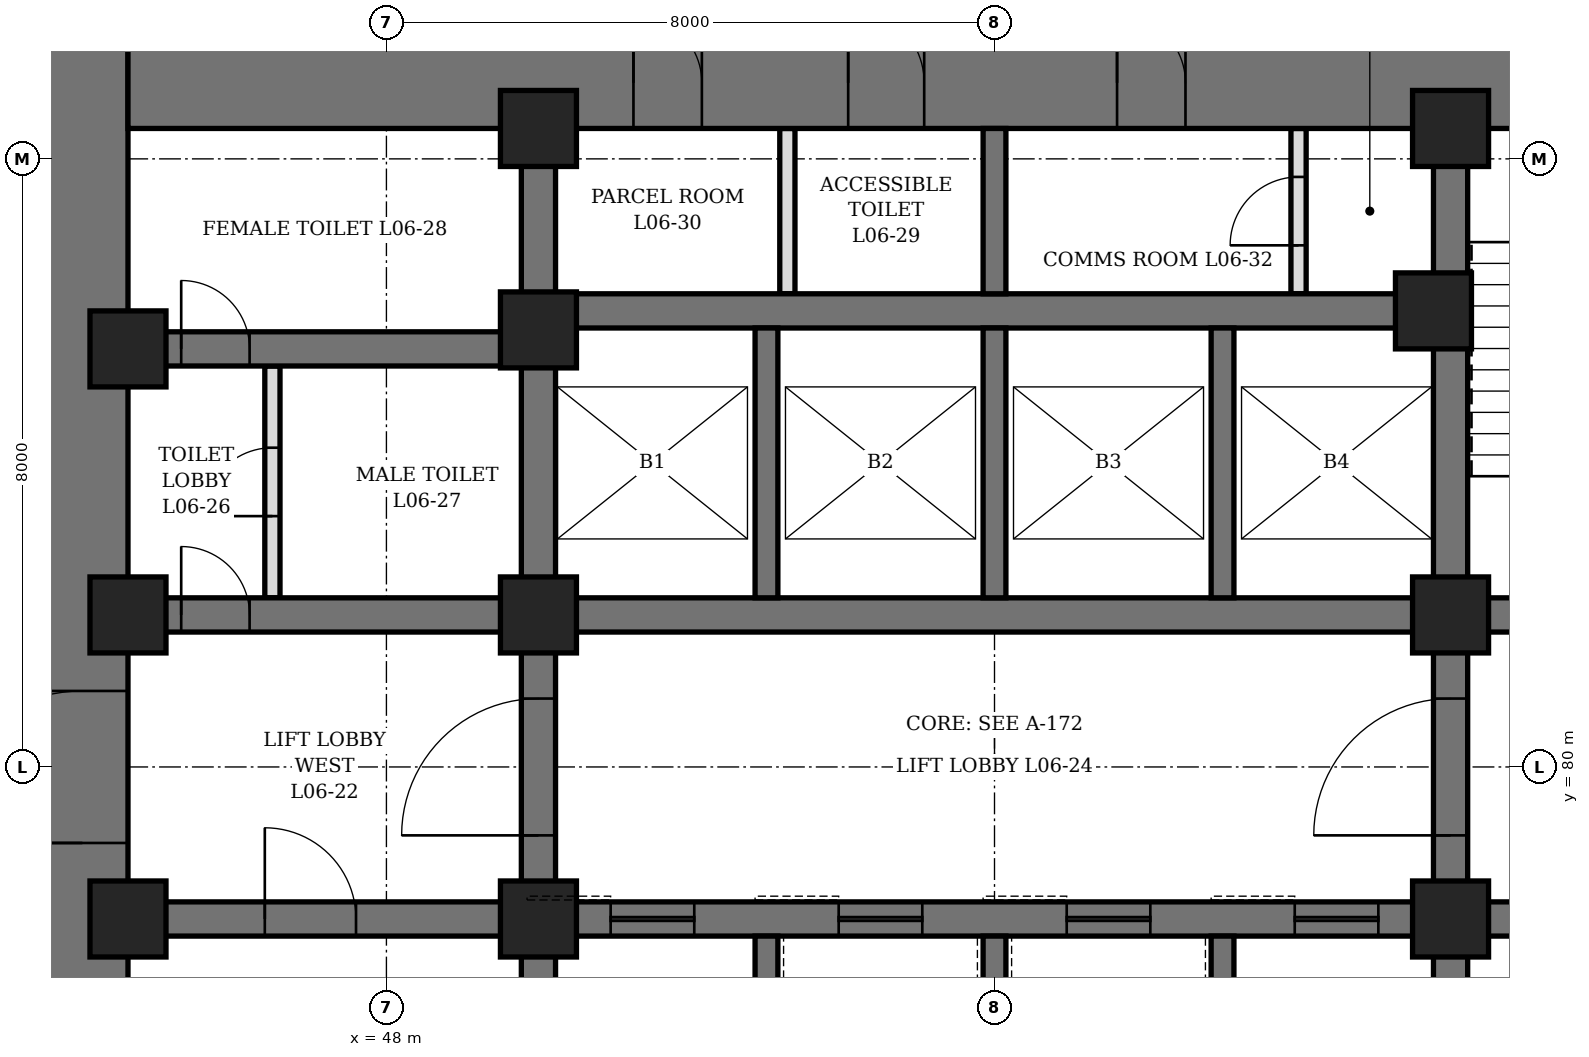
"""IFC4 building model, lengths in metres.
Left out: names, types, materials, properties, quantities, classifications, styles, units other than length and angle.
Written with IfcOpenShell. Run it as: python <this file> out.ifc"""

import sys

from ifc_helpers import new_model, si_unit, direction, frame, frame_2d, origin, origin_2d, place, context, subcontext, project, spatial, rectangle, hollow_rectangle, extrude, element, fill, save


model = new_model("IFC4")
c1 = context("Model", 3, precision=1e-05, world=origin(), true_north=direction((0.0, 1.0)))
c2 = subcontext(c1, "Body", "Model", "MODEL_VIEW")
j1 = project(units=[si_unit("LENGTHUNIT", "METRE"), si_unit("PLANEANGLEUNIT", "RADIAN")], contexts=[c1])
p1 = place(None, origin())
s1 = spatial("IfcSite", under=j1, at=p1, CompositionType="ELEMENT")
p2 = place(p1, origin())
s2 = spatial("IfcBuilding", under=s1, at=p2, CompositionType="ELEMENT")
p3 = place(p2, frame((0.0, 0.0, 34.9)))
s3 = spatial("IfcBuildingStorey", under=s2, at=p3, CompositionType="ELEMENT", Elevation=34.9)
p4 = place(p3, frame((44.0, 70.4, 0.0), z_axis=(0.0, 0.0, 1.0), x_axis=(0.0, 1.0, 0.0)))
e1 = element("IfcWall", 1, at=p4, inside=s3, PredefinedType="SHEAR", context=c2, shape_type="SweptSolid", body=[
    extrude(rectangle(XDim=19.2, YDim=1.2, at=frame_2d((9.6, 0.0))), origin(), (0.0, 0.0, 1.0), 4.2),
])
p5 = place(p4, frame((8.6, 0.0, 0.0)))
e2 = element("IfcOpeningElement", 2, at=p5, cuts=e1, PredefinedType="OPENING", context=c2, shape_type="SweptSolid", body=[
    extrude(rectangle(XDim=2.0, YDim=2.4, at=frame_2d((1.0, 1.2))), frame((0.0, 0.61, 0.0), z_axis=(0.0, -1.0, 0.0), x_axis=(1.0, 0.0, 0.0)), (0.0, 0.0, 1.0), 1.22),
])
p6 = place(p3, frame((44.6, 89.0, 0.0), z_axis=(0.0, 0.0, 1.0), x_axis=(1.0, 0.0, 0.0)))
e3 = element("IfcWall", 3, at=p6, inside=s3, PredefinedType="SHEAR", context=c2, shape_type="SweptSolid", body=[
    extrude(rectangle(XDim=22.8, YDim=1.2, at=frame_2d((11.4, 0.0))), origin(), (0.0, 0.0, 1.0), 4.2),
])
p7 = place(p6, frame((9.475, 0.0, 0.0)))
e4 = element("IfcOpeningElement", 4, at=p7, cuts=e3, PredefinedType="OPENING", context=c2, shape_type="SweptSolid", body=[
    extrude(rectangle(XDim=1.0, YDim=2.1, at=frame_2d((0.5, 1.05))), frame((0.0, 0.61, 0.0), z_axis=(0.0, -1.0, 0.0), x_axis=(1.0, 0.0, 0.0)), (0.0, 0.0, 1.0), 1.22),
])
p8 = place(p6, frame((6.65, 0.0, 0.0)))
e5 = element("IfcOpeningElement", 5, at=p8, cuts=e3, PredefinedType="OPENING", context=c2, shape_type="SweptSolid", body=[
    extrude(rectangle(XDim=0.9, YDim=2.1, at=frame_2d((0.45, 1.05))), frame((0.0, 0.61, 0.0), z_axis=(0.0, -1.0, 0.0), x_axis=(1.0, 0.0, 0.0)), (0.0, 0.0, 1.0), 1.22),
])
p9 = place(p6, frame((13.012, 0.0, 0.0)))
e6 = element("IfcOpeningElement", 6, at=p9, cuts=e3, PredefinedType="OPENING", context=c2, shape_type="SweptSolid", body=[
    extrude(rectangle(XDim=0.9, YDim=2.1, at=frame_2d((0.45, 1.05))), frame((0.0, 0.61, 0.0), z_axis=(0.0, -1.0, 0.0), x_axis=(1.0, 0.0, 0.0)), (0.0, 0.0, 1.0), 1.22),
])
p10 = place(p3, frame((50.0, 71.6, 0.0), z_axis=(0.0, 0.0, 1.0), x_axis=(0.0, 1.0, 0.0)))
e7 = element("IfcWall", 7, at=p10, inside=s3, PredefinedType="SHEAR", context=c2, shape_type="SweptSolid", body=[
    extrude(rectangle(XDim=16.8, YDim=0.45, at=frame_2d((8.4, 0.0))), origin(), (0.0, 0.0, 1.0), 4.2),
])
p11 = place(p10, frame((7.5, 0.0, 0.0)))
e8 = element("IfcOpeningElement", 8, at=p11, cuts=e7, PredefinedType="OPENING", context=c2, shape_type="SweptSolid", body=[
    extrude(rectangle(XDim=1.8, YDim=2.4, at=frame_2d((0.9, 1.2))), frame((0.0, 0.235, 0.0), z_axis=(0.0, -1.0, 0.0), x_axis=(1.0, 0.0, 0.0)), (0.0, 0.0, 1.0), 0.47),
])
p12 = place(p3, frame((62.0, 71.6, 0.0), z_axis=(0.0, 0.0, 1.0), x_axis=(0.0, 1.0, 0.0)))
e9 = element("IfcWall", 9, at=p12, inside=s3, PredefinedType="SHEAR", context=c2, shape_type="SweptSolid", body=[
    extrude(rectangle(XDim=16.8, YDim=0.45, at=frame_2d((8.4, 0.0))), origin(), (0.0, 0.0, 1.0), 4.2),
])
p13 = place(p12, frame((7.5, 0.0, 0.0)))
e10 = element("IfcOpeningElement", 10, at=p13, cuts=e9, PredefinedType="OPENING", context=c2, shape_type="SweptSolid", body=[
    extrude(rectangle(XDim=1.8, YDim=2.4, at=frame_2d((0.9, 1.2))), frame((0.0, 0.235, 0.0), z_axis=(0.0, -1.0, 0.0), x_axis=(1.0, 0.0, 0.0)), (0.0, 0.0, 1.0), 0.47),
])
p14 = place(p3, frame((44.6, 78.0, 0.0), z_axis=(0.0, 0.0, 1.0), x_axis=(1.0, 0.0, 0.0)))
e11 = element("IfcWall", 11, at=p14, inside=s3, PredefinedType="SHEAR", context=c2, shape_type="SweptSolid", body=[
    extrude(rectangle(XDim=5.175, YDim=0.45, at=frame_2d((2.587, 0.0))), origin(), (0.0, 0.0, 1.0), 4.2),
])
p15 = place(p14, frame((1.8, 0.0, 0.0)))
e12 = element("IfcOpeningElement", 12, at=p15, cuts=e11, PredefinedType="OPENING", context=c2, shape_type="SweptSolid", body=[
    extrude(rectangle(XDim=1.2, YDim=2.1, at=frame_2d((0.6, 1.05))), frame((0.0, 0.235, 0.0), z_axis=(0.0, -1.0, 0.0), x_axis=(1.0, 0.0, 0.0)), (0.0, 0.0, 1.0), 0.47),
])
p16 = place(p3, frame((44.6, 82.0, 0.0), z_axis=(0.0, 0.0, 1.0), x_axis=(1.0, 0.0, 0.0)))
e13 = element("IfcWall", 13, at=p16, inside=s3, PredefinedType="SHEAR", context=c2, shape_type="SweptSolid", body=[
    extrude(rectangle(XDim=5.175, YDim=0.45, at=frame_2d((2.587, 0.0))), origin(), (0.0, 0.0, 1.0), 4.2),
])
p17 = place(p16, frame((0.7, 0.0, 0.0)))
e14 = element("IfcOpeningElement", 14, at=p17, cuts=e13, PredefinedType="OPENING", context=c2, shape_type="SweptSolid", body=[
    extrude(rectangle(XDim=0.9, YDim=2.1, at=frame_2d((0.45, 1.05))), frame((0.0, 0.235, 0.0), z_axis=(0.0, -1.0, 0.0), x_axis=(1.0, 0.0, 0.0)), (0.0, 0.0, 1.0), 0.47),
])
p18 = place(p3, frame((44.6, 85.5, 0.0), z_axis=(0.0, 0.0, 1.0), x_axis=(1.0, 0.0, 0.0)))
e15 = element("IfcWall", 15, at=p18, inside=s3, PredefinedType="SHEAR", context=c2, shape_type="SweptSolid", body=[
    extrude(rectangle(XDim=5.175, YDim=0.45, at=frame_2d((2.587, 0.0))), origin(), (0.0, 0.0, 1.0), 4.2),
])
p19 = place(p18, frame((0.7, 0.0, 0.0)))
e16 = element("IfcOpeningElement", 16, at=p19, cuts=e15, PredefinedType="OPENING", context=c2, shape_type="SweptSolid", body=[
    extrude(rectangle(XDim=0.9, YDim=2.1, at=frame_2d((0.45, 1.05))), frame((0.0, 0.235, 0.0), z_axis=(0.0, -1.0, 0.0), x_axis=(1.0, 0.0, 0.0)), (0.0, 0.0, 1.0), 0.47),
])
p20 = place(p3, frame((62.225, 78.0, 0.0), z_axis=(0.0, 0.0, 1.0), x_axis=(1.0, 0.0, 0.0)))
e17 = element("IfcWall", 17, at=p20, inside=s3, PredefinedType="SHEAR", context=c2, shape_type="SweptSolid", body=[
    extrude(rectangle(XDim=5.175, YDim=0.45, at=frame_2d((2.587, 0.0))), origin(), (0.0, 0.0, 1.0), 4.2),
])
p21 = place(p20, frame((2.175, 0.0, 0.0)))
e18 = element("IfcOpeningElement", 18, at=p21, cuts=e17, PredefinedType="OPENING", context=c2, shape_type="SweptSolid", body=[
    extrude(rectangle(XDim=1.2, YDim=2.1, at=frame_2d((0.6, 1.05))), frame((0.0, 0.235, 0.0), z_axis=(0.0, -1.0, 0.0), x_axis=(1.0, 0.0, 0.0)), (0.0, 0.0, 1.0), 0.47),
])
p22 = place(p3, frame((62.225, 82.0, 0.0), z_axis=(0.0, 0.0, 1.0), x_axis=(1.0, 0.0, 0.0)))
e19 = element("IfcWall", 19, at=p22, inside=s3, PredefinedType="SHEAR", context=c2, shape_type="SweptSolid", body=[
    extrude(rectangle(XDim=5.175, YDim=0.45, at=frame_2d((2.587, 0.0))), origin(), (0.0, 0.0, 1.0), 4.2),
])
p23 = place(p22, frame((2.175, 0.0, 0.0)))
e20 = element("IfcOpeningElement", 20, at=p23, cuts=e19, PredefinedType="OPENING", context=c2, shape_type="SweptSolid", body=[
    extrude(rectangle(XDim=1.2, YDim=2.1, at=frame_2d((0.6, 1.05))), frame((0.0, 0.235, 0.0), z_axis=(0.0, -1.0, 0.0), x_axis=(1.0, 0.0, 0.0)), (0.0, 0.0, 1.0), 0.47),
])
p24 = place(p3, frame((50.225, 78.0, 0.0), z_axis=(0.0, 0.0, 1.0), x_axis=(1.0, 0.0, 0.0)))
e21 = element("IfcWall", 21, at=p24, inside=s3, PredefinedType="SHEAR", context=c2, shape_type="SweptSolid", body=[
    extrude(rectangle(XDim=11.55, YDim=0.45, at=frame_2d((5.775, 0.0))), origin(), (0.0, 0.0, 1.0), 4.2),
])
p25 = place(p24, frame((0.725, 0.0, 0.0)))
e22 = element("IfcOpeningElement", 22, at=p25, cuts=e21, PredefinedType="OPENING", context=c2, shape_type="SweptSolid", body=[
    extrude(rectangle(XDim=1.1, YDim=2.2, at=frame_2d((0.55, 1.1))), frame((0.0, 0.235, 0.0), z_axis=(0.0, -1.0, 0.0), x_axis=(1.0, 0.0, 0.0)), (0.0, 0.0, 1.0), 0.47),
])
p26 = place(p24, frame((3.725, 0.0, 0.0)))
e23 = element("IfcOpeningElement", 23, at=p26, cuts=e21, PredefinedType="OPENING", context=c2, shape_type="SweptSolid", body=[
    extrude(rectangle(XDim=1.1, YDim=2.2, at=frame_2d((0.55, 1.1))), frame((0.0, 0.235, 0.0), z_axis=(0.0, -1.0, 0.0), x_axis=(1.0, 0.0, 0.0)), (0.0, 0.0, 1.0), 0.47),
])
p27 = place(p24, frame((6.725, 0.0, 0.0)))
e24 = element("IfcOpeningElement", 24, at=p27, cuts=e21, PredefinedType="OPENING", context=c2, shape_type="SweptSolid", body=[
    extrude(rectangle(XDim=1.1, YDim=2.2, at=frame_2d((0.55, 1.1))), frame((0.0, 0.235, 0.0), z_axis=(0.0, -1.0, 0.0), x_axis=(1.0, 0.0, 0.0)), (0.0, 0.0, 1.0), 0.47),
])
p28 = place(p24, frame((9.725, 0.0, 0.0)))
e25 = element("IfcOpeningElement", 25, at=p28, cuts=e21, PredefinedType="OPENING", context=c2, shape_type="SweptSolid", body=[
    extrude(rectangle(XDim=1.1, YDim=2.2, at=frame_2d((0.55, 1.1))), frame((0.0, 0.235, 0.0), z_axis=(0.0, -1.0, 0.0), x_axis=(1.0, 0.0, 0.0)), (0.0, 0.0, 1.0), 0.47),
])
for number, where, z_axis, x_axis in (
    (26, (50.225, 82.0, 0.0), (0.0, 0.0, 1.0), (1.0, 0.0, 0.0)),
    (27, (50.225, 86.0, 0.0), (0.0, 0.0, 1.0), (1.0, 0.0, 0.0)),
):
    element("IfcWall", number, at=place(p3, frame(where, z_axis=z_axis, x_axis=x_axis)), inside=s3, PredefinedType="SHEAR", context=c2, shape_type="SweptSolid", body=[
        extrude(rectangle(XDim=11.55, YDim=0.45, at=frame_2d((5.775, 0.0))), origin(), (0.0, 0.0, 1.0), 4.2),
    ])
p29 = place(p3, frame((53.0, 74.15, 0.0), z_axis=(0.0, 0.0, 1.0), x_axis=(0.0, 1.0, 0.0)))
e28 = element("IfcWall", 28, at=p29, inside=s3, PredefinedType="SHEAR", context=c2, shape_type="SweptSolid", body=[
    extrude(rectangle(XDim=3.625, YDim=0.3, at=frame_2d((1.812, 0.0))), origin(), (0.0, 0.0, 1.0), 4.2),
])
p30 = place(p3, frame((53.0, 82.225, 0.0), z_axis=(0.0, 0.0, 1.0), x_axis=(0.0, 1.0, 0.0)))
e29 = element("IfcWall", 29, at=p30, inside=s3, PredefinedType="SHEAR", context=c2, shape_type="SweptSolid", body=[
    extrude(rectangle(XDim=3.55, YDim=0.3, at=frame_2d((1.775, 0.0))), origin(), (0.0, 0.0, 1.0), 4.2),
])
p31 = place(p3, frame((56.0, 74.15, 0.0), z_axis=(0.0, 0.0, 1.0), x_axis=(0.0, 1.0, 0.0)))
e30 = element("IfcWall", 30, at=p31, inside=s3, PredefinedType="SHEAR", context=c2, shape_type="SweptSolid", body=[
    extrude(rectangle(XDim=3.625, YDim=0.3, at=frame_2d((1.812, 0.0))), origin(), (0.0, 0.0, 1.0), 4.2),
])
p32 = place(p3, frame((56.0, 82.225, 0.0), z_axis=(0.0, 0.0, 1.0), x_axis=(0.0, 1.0, 0.0)))
e31 = element("IfcWall", 31, at=p32, inside=s3, PredefinedType="SHEAR", context=c2, shape_type="SweptSolid", body=[
    extrude(rectangle(XDim=3.55, YDim=0.3, at=frame_2d((1.775, 0.0))), origin(), (0.0, 0.0, 1.0), 4.2),
])
p33 = place(p3, frame((59.0, 74.15, 0.0), z_axis=(0.0, 0.0, 1.0), x_axis=(0.0, 1.0, 0.0)))
e32 = element("IfcWall", 32, at=p33, inside=s3, PredefinedType="SHEAR", context=c2, shape_type="SweptSolid", body=[
    extrude(rectangle(XDim=3.625, YDim=0.3, at=frame_2d((1.812, 0.0))), origin(), (0.0, 0.0, 1.0), 4.2),
])
p34 = place(p3, frame((59.0, 82.225, 0.0), z_axis=(0.0, 0.0, 1.0), x_axis=(0.0, 1.0, 0.0)))
e33 = element("IfcWall", 33, at=p34, inside=s3, PredefinedType="SHEAR", context=c2, shape_type="SweptSolid", body=[
    extrude(rectangle(XDim=3.55, YDim=0.3, at=frame_2d((1.775, 0.0))), origin(), (0.0, 0.0, 1.0), 4.2),
])
p35 = place(p3, frame((56.0, 86.225, 0.0), z_axis=(0.0, 0.0, 1.0), x_axis=(0.0, 1.0, 0.0)))
e34 = element("IfcWall", 34, at=p35, inside=s3, PredefinedType="SHEAR", context=c2, shape_type="SweptSolid", body=[
    extrude(rectangle(XDim=2.175, YDim=0.3, at=frame_2d((1.087, 0.0))), origin(), (0.0, 0.0, 1.0), 4.2),
])
for number, where, z_axis, x_axis in (
    (35, (44.6, 78.0, 0.0), (0.0, 0.0, 1.0), (1.0, 0.0, 0.0)),
    (36, (44.6, 82.0, 0.0), (0.0, 0.0, 1.0), (1.0, 0.0, 0.0)),
    (37, (44.6, 85.5, 0.0), (0.0, 0.0, 1.0), (1.0, 0.0, 0.0)),
    (38, (50.0, 78.0, 0.0), (0.0, 0.0, 1.0), (1.0, 0.0, 0.0)),
    (39, (50.0, 82.0, 0.0), (0.0, 0.0, 1.0), (1.0, 0.0, 0.0)),
    (40, (50.0, 85.75, 0.0), (0.0, 0.0, 1.0), (1.0, 0.0, 0.0)),
    (41, (50.0, 88.4, 0.0), (0.0, 0.0, 1.0), (1.0, 0.0, 0.0)),
    (42, (61.775, 86.0, 0.0), (0.0, 0.0, 1.0), (1.0, 0.0, 0.0)),
    (43, (62.0, 78.0, 0.0), (0.0, 0.0, 1.0), (1.0, 0.0, 0.0)),
    (44, (62.0, 82.0, 0.0), (0.0, 0.0, 1.0), (1.0, 0.0, 0.0)),
    (45, (62.0, 88.4, 0.0), (0.0, 0.0, 1.0), (1.0, 0.0, 0.0)),
):
    element("IfcColumn", number, at=place(p3, frame(where, z_axis=z_axis, x_axis=x_axis)), inside=s3, PredefinedType="COLUMN", context=c2, shape_type="SweptSolid", body=[
        extrude(hollow_rectangle(XDim=1.0, YDim=1.0, WallThickness=0.15, at=origin_2d()), origin(), (0.0, 0.0, 1.0), 4.2),
    ])
p36 = place(p3, frame((46.5, 82.225, 0.0), z_axis=(0.0, 0.0, 1.0), x_axis=(0.0, 1.0, 0.0)))
e46 = element("IfcWall", 46, at=p36, inside=s3, PredefinedType="PARTITIONING", context=c2, shape_type="SweptSolid", body=[
    extrude(rectangle(XDim=3.05, YDim=0.2, at=frame_2d((1.525, 0.0))), origin(), (0.0, 0.0, 1.0), 4.04),
])
p37 = place(p36, frame((1.075, 0.0, 0.0)))
e47 = element("IfcOpeningElement", 47, at=p37, cuts=e46, PredefinedType="OPENING", context=c2, shape_type="SweptSolid", body=[
    extrude(rectangle(XDim=0.9, YDim=2.1, at=frame_2d((0.45, 1.05))), frame((0.0, 0.11, 0.0), z_axis=(0.0, -1.0, 0.0), x_axis=(1.0, 0.0, 0.0)), (0.0, 0.0, 1.0), 0.22),
])
p38 = place(p3, frame((53.275, 86.225, 0.0), z_axis=(0.0, 0.0, 1.0), x_axis=(0.0, 1.0, 0.0)))
e48 = element("IfcWall", 48, at=p38, inside=s3, PredefinedType="PARTITIONING", context=c2, shape_type="SweptSolid", body=[
    extrude(rectangle(XDim=2.175, YDim=0.2, at=frame_2d((1.087, 0.0))), origin(), (0.0, 0.0, 1.0), 4.04),
])
p39 = place(p3, frame((60.0, 86.225, 0.0), z_axis=(0.0, 0.0, 1.0), x_axis=(0.0, 1.0, 0.0)))
e49 = element("IfcWall", 49, at=p39, inside=s3, PredefinedType="PARTITIONING", context=c2, shape_type="SweptSolid", body=[
    extrude(rectangle(XDim=2.175, YDim=0.2, at=frame_2d((1.087, 0.0))), origin(), (0.0, 0.0, 1.0), 4.04),
])
p40 = place(p39, frame((0.637, 0.0, 0.0)))
e50 = element("IfcOpeningElement", 50, at=p40, cuts=e49, PredefinedType="OPENING", context=c2, shape_type="SweptSolid", body=[
    extrude(rectangle(XDim=0.9, YDim=2.1, at=frame_2d((0.45, 1.05))), frame((0.0, 0.11, 0.0), z_axis=(0.0, -1.0, 0.0), x_axis=(1.0, 0.0, 0.0)), (0.0, 0.0, 1.0), 0.22),
])
p41 = place(p17, origin())
e51 = element("IfcDoor", 51, at=p41, inside=s3, OperationType="SINGLE_SWING_LEFT", PredefinedType="DOOR", context=c2, shape_type="SweptSolid", body=[
    extrude(rectangle(XDim=0.9, YDim=2.1, at=frame_2d((0.45, 1.05))), frame((0.0, 0.225, 0.0), z_axis=(0.0, -1.0, 0.0), x_axis=(1.0, 0.0, 0.0)), (0.0, 0.0, 1.0), 0.449),
])
fill(e14, e51)
p42 = place(p37, origin())
e52 = element("IfcDoor", 52, at=p42, inside=s3, OperationType="SINGLE_SWING_RIGHT", PredefinedType="DOOR", context=c2, shape_type="SweptSolid", body=[
    extrude(rectangle(XDim=0.9, YDim=2.1, at=frame_2d((0.45, 1.05))), frame((0.0, 0.1, 0.0), z_axis=(0.0, -1.0, 0.0), x_axis=(1.0, 0.0, 0.0)), (0.0, 0.0, 1.0), 0.199),
])
fill(e47, e52)
p43 = place(p19, origin())
e53 = element("IfcDoor", 53, at=p43, inside=s3, OperationType="SINGLE_SWING_RIGHT", PredefinedType="DOOR", context=c2, shape_type="SweptSolid", body=[
    extrude(rectangle(XDim=0.9, YDim=2.1, at=frame_2d((0.45, 1.05))), frame((0.0, 0.225, 0.0), z_axis=(0.0, -1.0, 0.0), x_axis=(1.0, 0.0, 0.0)), (0.0, 0.0, 1.0), 0.449),
])
fill(e16, e53)
p44 = place(p7, origin())
e54 = element("IfcDoor", 54, at=p44, inside=s3, OperationType="SINGLE_SWING_LEFT", PredefinedType="DOOR", context=c2, shape_type="SweptSolid", body=[
    extrude(rectangle(XDim=1.0, YDim=2.1, at=frame_2d((0.5, 1.05))), frame((0.0, 0.35, 0.0), z_axis=(0.0, -1.0, 0.0), x_axis=(1.0, 0.0, 0.0)), (0.0, 0.0, 1.0), 0.7),
])
fill(e4, e54)
p45 = place(p8, origin())
e55 = element("IfcDoor", 55, at=p45, inside=s3, OperationType="SINGLE_SWING_LEFT", PredefinedType="DOOR", context=c2, shape_type="SweptSolid", body=[
    extrude(rectangle(XDim=0.9, YDim=2.1, at=frame_2d((0.45, 1.05))), frame((0.0, 0.35, 0.0), z_axis=(0.0, -1.0, 0.0), x_axis=(1.0, 0.0, 0.0)), (0.0, 0.0, 1.0), 0.7),
])
fill(e5, e55)
p46 = place(p9, origin())
e56 = element("IfcDoor", 56, at=p46, inside=s3, OperationType="SINGLE_SWING_LEFT", PredefinedType="DOOR", context=c2, shape_type="SweptSolid", body=[
    extrude(rectangle(XDim=0.9, YDim=2.1, at=frame_2d((0.45, 1.05))), frame((0.0, 0.35, 0.0), z_axis=(0.0, -1.0, 0.0), x_axis=(1.0, 0.0, 0.0)), (0.0, 0.0, 1.0), 0.7),
])
fill(e6, e56)
p47 = place(p40, origin())
e57 = element("IfcDoor", 57, at=p47, inside=s3, OperationType="SINGLE_SWING_LEFT", PredefinedType="DOOR", context=c2, shape_type="SweptSolid", body=[
    extrude(rectangle(XDim=0.9, YDim=2.1, at=frame_2d((0.45, 1.05))), frame((0.0, 0.1, 0.0), z_axis=(0.0, -1.0, 0.0), x_axis=(1.0, 0.0, 0.0)), (0.0, 0.0, 1.0), 0.199),
])
fill(e50, e57)
p48 = place(p15, origin())
e58 = element("IfcDoor", 58, at=p48, inside=s3, OperationType="SINGLE_SWING_LEFT", PredefinedType="DOOR", context=c2, shape_type="SweptSolid", body=[
    extrude(rectangle(XDim=1.2, YDim=2.1, at=frame_2d((0.6, 1.05))), frame((0.0, 0.225, 0.0), z_axis=(0.0, -1.0, 0.0), x_axis=(1.0, 0.0, 0.0)), (0.0, 0.0, 1.0), 0.449),
])
fill(e12, e58)
p49 = place(p5, origin())
e59 = element("IfcDoor", 59, at=p49, inside=s3, OperationType="DOUBLE_DOOR_SINGLE_SWING", PredefinedType="DOOR", context=c2, shape_type="SweptSolid", body=[
    extrude(rectangle(XDim=2.0, YDim=2.4, at=frame_2d((1.0, 1.2))), frame((0.0, 0.35, 0.0), z_axis=(0.0, -1.0, 0.0), x_axis=(1.0, 0.0, 0.0)), (0.0, 0.0, 1.0), 0.7),
])
fill(e2, e59)
p50 = place(p11, origin())
e60 = element("IfcDoor", 60, at=p50, inside=s3, OperationType="DOUBLE_DOOR_SINGLE_SWING", PredefinedType="DOOR", context=c2, shape_type="SweptSolid", body=[
    extrude(rectangle(XDim=1.8, YDim=2.4, at=frame_2d((0.9, 1.2))), frame((0.0, 0.225, 0.0), z_axis=(0.0, -1.0, 0.0), x_axis=(1.0, 0.0, 0.0)), (0.0, 0.0, 1.0), 0.449),
])
fill(e8, e60)
p51 = place(p13, origin())
e61 = element("IfcDoor", 61, at=p51, inside=s3, OperationType="DOUBLE_DOOR_SINGLE_SWING", PredefinedType="DOOR", context=c2, shape_type="SweptSolid", body=[
    extrude(rectangle(XDim=1.8, YDim=2.4, at=frame_2d((0.9, 1.2))), frame((0.0, 0.225, 0.0), z_axis=(0.0, -1.0, 0.0), x_axis=(1.0, 0.0, 0.0)), (0.0, 0.0, 1.0), 0.449),
])
fill(e10, e61)
p52 = place(p25, origin())
e62 = element("IfcDoor", 62, at=p52, inside=s3, OperationType="SLIDING_TO_LEFT", PredefinedType="DOOR", context=c2, shape_type="SweptSolid", body=[
    extrude(rectangle(XDim=1.1, YDim=2.2, at=frame_2d((0.55, 1.1))), frame((0.0, 0.225, 0.0), z_axis=(0.0, -1.0, 0.0), x_axis=(1.0, 0.0, 0.0)), (0.0, 0.0, 1.0), 0.449),
])
fill(e22, e62)
p53 = place(p26, origin())
e63 = element("IfcDoor", 63, at=p53, inside=s3, OperationType="SLIDING_TO_LEFT", PredefinedType="DOOR", context=c2, shape_type="SweptSolid", body=[
    extrude(rectangle(XDim=1.1, YDim=2.2, at=frame_2d((0.55, 1.1))), frame((0.0, 0.225, 0.0), z_axis=(0.0, -1.0, 0.0), x_axis=(1.0, 0.0, 0.0)), (0.0, 0.0, 1.0), 0.449),
])
fill(e23, e63)
p54 = place(p27, origin())
e64 = element("IfcDoor", 64, at=p54, inside=s3, OperationType="SLIDING_TO_LEFT", PredefinedType="DOOR", context=c2, shape_type="SweptSolid", body=[
    extrude(rectangle(XDim=1.1, YDim=2.2, at=frame_2d((0.55, 1.1))), frame((0.0, 0.225, 0.0), z_axis=(0.0, -1.0, 0.0), x_axis=(1.0, 0.0, 0.0)), (0.0, 0.0, 1.0), 0.449),
])
fill(e24, e64)
p55 = place(p28, origin())
e65 = element("IfcDoor", 65, at=p55, inside=s3, OperationType="SLIDING_TO_LEFT", PredefinedType="DOOR", context=c2, shape_type="SweptSolid", body=[
    extrude(rectangle(XDim=1.1, YDim=2.2, at=frame_2d((0.55, 1.1))), frame((0.0, 0.225, 0.0), z_axis=(0.0, -1.0, 0.0), x_axis=(1.0, 0.0, 0.0)), (0.0, 0.0, 1.0), 0.449),
])
fill(e25, e65)
save(model, sys.argv[1])
